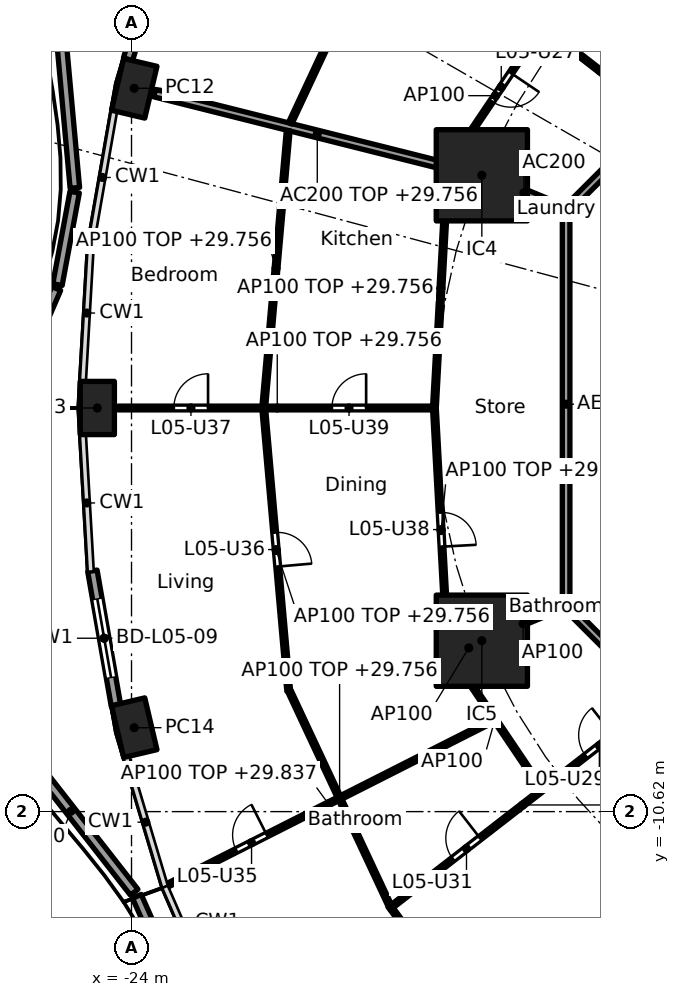
"""IFC4 building model, lengths in metres.
Left out: names, types, materials, properties, quantities, classifications, styles, units other than length and angle.
Written with IfcOpenShell. Run it as: python <this file> out.ifc"""

import sys

from ifc_helpers import new_model, si_unit, direction, frame, frame_2d, origin, origin_2d, place, context, subcontext, project, spatial, rectangle, hollow_rectangle, extrude, element, fill, save


model = new_model("IFC4")
c1 = context("Model", 3, precision=1e-05, world=origin(), true_north=direction((0.0, 1.0)))
c2 = subcontext(c1, "Body", "Model", "MODEL_VIEW")
j1 = project(units=[si_unit("LENGTHUNIT", "METRE"), si_unit("PLANEANGLEUNIT", "RADIAN")], contexts=[c1])
p1 = place(None, origin())
s1 = spatial("IfcSite", under=j1, at=p1, CompositionType="ELEMENT")
p2 = place(p1, origin())
s2 = spatial("IfcBuilding", under=s1, at=p2, CompositionType="ELEMENT")
p3 = place(p2, frame((0.0, 0.0, 27.0)))
s3 = spatial("IfcBuildingStorey", under=s2, at=p3, CompositionType="ELEMENT", Elevation=27.0)
for number, where, z_axis, x_axis in (
    (1, (-23.929, 8.412, 0.0), (0.0, 0.0, 1.0), (-0.229, -0.973, 0.0)),
    (2, (-24.9, 0.0, 0.0), (0.0, 0.0, 1.0), (0.0, -1.0, 0.0)),
    (3, (-23.929, -8.412, 0.0), (0.0, 0.0, 1.0), (0.229, -0.973, 0.0)),
):
    element("IfcColumn", number, at=place(p3, frame(where, z_axis=z_axis, x_axis=x_axis)), inside=s3, PredefinedType="COLUMN", context=c2, shape_type="SweptSolid", body=[
        extrude(hollow_rectangle(XDim=1.4, YDim=0.9, WallThickness=0.05, at=origin_2d()), origin(), (0.0, 0.0, 1.0), 3.7),
    ])
for number, where, z_axis, x_axis in (
    (4, (-14.782, 6.123, 0.0), (0.0, 0.0, 1.0), (1.0, 0.0, 0.0)),
    (5, (-14.782, -6.123, 0.0), (0.0, 0.0, 1.0), (1.0, 0.0, 0.0)),
):
    element("IfcColumn", number, at=place(p3, frame(where, z_axis=z_axis, x_axis=x_axis)), inside=s3, PredefinedType="COLUMN", context=c2, shape_type="SweptSolid", body=[
        extrude(rectangle(XDim=2.4, YDim=2.4, at=origin_2d()), origin(), (0.0, 0.0, 1.0), 3.7),
    ])
p4 = place(p3, frame((-24.092, 9.176, 0.0), z_axis=(0.0, 0.0, 1.0), x_axis=(0.285871309426, 0.958268018065, 0.0)))
e6 = element("IfcWall", 6, at=p4, inside=s3, PredefinedType="SOLIDWALL", context=c2, shape_type="SweptSolid", body=[
    extrude(rectangle(XDim=3.565, YDim=0.25, at=frame_2d((1.783, 0.0))), origin(), (0.0, 0.0, 1.0), 3.44),
])
p5 = place(p4, frame((0.733, 0.0, 0.0)))
e7 = element("IfcOpeningElement", 7, at=p5, cuts=e6, PredefinedType="OPENING", context=c2, shape_type="SweptSolid", body=[
    extrude(rectangle(XDim=2.1, YDim=2.4, at=frame_2d((1.05, 1.2))), frame((0.0, 0.135, 0.0), z_axis=(0.0, -1.0, 0.0), x_axis=(1.0, 0.0, 0.0)), (0.0, 0.0, 1.0), 0.27),
])
p6 = place(p3, frame((-24.409, -7.83, 0.0), z_axis=(0.0, 0.0, 1.0), x_axis=(-0.172217377323, 0.98505897029, 0.0)))
e8 = element("IfcWall", 8, at=p6, inside=s3, PredefinedType="SOLIDWALL", context=c2, shape_type="SweptSolid", body=[
    extrude(rectangle(XDim=3.598, YDim=0.25, at=frame_2d((1.799, 0.0))), origin(), (0.0, 0.0, 1.0), 3.44),
])
p7 = place(p6, frame((0.749, 0.0, 0.0)))
e9 = element("IfcOpeningElement", 9, at=p7, cuts=e8, PredefinedType="OPENING", context=c2, shape_type="SweptSolid", body=[
    extrude(rectangle(XDim=2.1, YDim=2.4, at=frame_2d((1.05, 1.2))), frame((0.0, 0.135, 0.0), z_axis=(0.0, -1.0, 0.0), x_axis=(1.0, 0.0, 0.0)), (0.0, 0.0, 1.0), 0.27),
])
p8 = place(p3, frame((-26.223, 13.822, 0.0), z_axis=(0.0, 0.0, 1.0), x_axis=(0.090830569169, -0.995866360364, 0.0)))
e10 = element("IfcWall", 10, at=p8, inside=s3, PredefinedType="PARAPET", context=c2, shape_type="SweptSolid", body=[
    extrude(rectangle(XDim=8.064, YDim=0.25, at=frame_2d((4.032, 0.0))), origin(), (0.0, 0.0, 1.0), 1.1),
])
p9 = place(p3, frame((-25.496, 5.679, 0.0), z_axis=(0.0, 0.0, 1.0), x_axis=(-0.182584016384, -0.983190254712, 0.0)))
e11 = element("IfcWall", 11, at=p9, inside=s3, PredefinedType="PARAPET", context=c2, shape_type="SweptSolid", body=[
    extrude(rectangle(XDim=2.474, YDim=0.25, at=frame_2d((1.237, 0.0))), origin(), (0.0, 0.0, 1.0), 1.1),
])
p10 = place(p3, frame((-25.979, 3.144, 0.0), z_axis=(0.0, 0.0, 1.0), x_axis=(-0.397314501354, -0.917682508831, 0.0)))
e12 = element("IfcWall", 12, at=p10, inside=s3, PredefinedType="PARAPET", context=c2, shape_type="SweptSolid", body=[
    extrude(rectangle(XDim=3.555, YDim=0.25, at=frame_2d((1.778, 0.0))), origin(), (0.0, 0.0, 1.0), 1.1),
])
p11 = place(p3, frame((-27.261, -8.48, 0.0), z_axis=(0.0, 0.0, 1.0), x_axis=(0.615882240598, -0.787838223061, 0.0)))
e13 = element("IfcWall", 13, at=p11, inside=s3, PredefinedType="PARAPET", context=c2, shape_type="SweptSolid", body=[
    extrude(rectangle(XDim=5.409, YDim=0.25, at=frame_2d((2.705, 0.0))), origin(), (0.0, 0.0, 1.0), 1.1),
])
p12 = place(p3, frame((-23.859, -12.849, 0.0), z_axis=(0.0, 0.0, 1.0), x_axis=(0.40486170938, -0.914377928582, 0.0)))
e14 = element("IfcWall", 14, at=p12, inside=s3, PredefinedType="PARAPET", context=c2, shape_type="SweptSolid", body=[
    extrude(rectangle(XDim=3.212, YDim=0.25, at=frame_2d((1.606, 0.0))), origin(), (0.0, 0.0, 1.0), 1.1),
])
p13 = place(p3, frame((-12.657, 5.243, 0.0), z_axis=(0.0, 0.0, 1.0), x_axis=(-0.923885664896, 0.382668627144, 0.0)))
e15 = element("IfcWall", 15, at=p13, inside=s3, PredefinedType="PARTITIONING", context=c2, shape_type="SweptSolid", body=[
    extrude(rectangle(XDim=2.2, YDim=0.2, at=frame_2d((1.1, 0.0))), origin(), (0.0, 0.0, 1.0), 3.44),
])
p14 = place(p3, frame((-14.831, 6.135, 0.0), z_axis=(0.0, 0.0, 1.0), x_axis=(-0.969884949569, 0.243563512454, 0.0)))
e16 = element("IfcWall", 16, at=p14, inside=s3, PredefinedType="PARTITIONING", context=c2, shape_type="SweptSolid", body=[
    extrude(rectangle(XDim=8.829, YDim=0.2, at=frame_2d((4.415, 0.0))), origin(), (0.0, 0.0, 1.0), 2.756),
])
p15 = place(p3, frame((-5.275, 12.494, 0.0), z_axis=(0.0, 0.0, 1.0), x_axis=(-0.707106781187, -0.707106781187, 0.0)))
e17 = element("IfcWall", 17, at=p15, inside=s3, PredefinedType="PARTITIONING", context=c2, shape_type="SweptSolid", body=[
    extrude(rectangle(XDim=10.209, YDim=0.2, at=frame_2d((5.104, 0.0))), origin(), (0.0, 0.0, 1.0), 3.44),
])
p16 = place(p3, frame((-12.565, 5.304, 0.0), z_axis=(0.0, 0.0, 1.0), x_axis=(0.0, -1.0, 0.0)))
e18 = element("IfcWall", 18, at=p16, inside=s3, PredefinedType="PARTITIONING", context=c2, shape_type="SweptSolid", body=[
    extrude(rectangle(XDim=10.409, YDim=0.2, at=frame_2d((5.205, 0.0))), origin(), (0.0, 0.0, 1.0), 3.44),
])
p17 = place(p3, frame((-12.635, -5.134, 0.0), z_axis=(0.0, 0.0, 1.0), x_axis=(0.707106781187, -0.707106781187, 0.0)))
e19 = element("IfcWall", 19, at=p17, inside=s3, PredefinedType="PARTITIONING", context=c2, shape_type="SweptSolid", body=[
    extrude(rectangle(XDim=10.609, YDim=0.2, at=frame_2d((5.305, 0.0))), origin(), (0.0, 0.0, 1.0), 3.44),
])
p18 = place(p17, frame((4.804, 0.0, 0.0)))
e20 = element("IfcOpeningElement", 20, at=p18, cuts=e19, PredefinedType="OPENING", context=c2, shape_type="SweptSolid", body=[
    extrude(rectangle(XDim=1.0, YDim=2.1, at=frame_2d((0.5, 1.05))), frame((0.0, 0.11, 0.0), z_axis=(0.0, -1.0, 0.0), x_axis=(1.0, 0.0, 0.0)), (0.0, 0.0, 1.0), 0.22),
])
p19 = place(p3, frame((-10.19, 7.719, 0.0), z_axis=(0.0, 0.0, 1.0), x_axis=(-0.790253294643, 0.612780327937, 0.0)))
e21 = element("IfcWall", 21, at=p19, inside=s3, PredefinedType="PARTITIONING", context=c2, shape_type="SweptSolid", body=[
    extrude(rectangle(XDim=3.746, YDim=0.1, at=frame_2d((1.873, 0.0))), origin(), (0.0, 0.0, 1.0), 2.687),
])
p20 = place(p3, frame((-13.218, 10.004, 0.0), z_axis=(0.0, 0.0, 1.0), x_axis=(-0.559112679527, -0.829091678641, 0.0)))
e22 = element("IfcWall", 22, at=p20, inside=s3, PredefinedType="PARTITIONING", context=c2, shape_type="SweptSolid", body=[
    extrude(rectangle(XDim=4.308, YDim=0.1, at=frame_2d((2.154, 0.0))), origin(), (0.0, 0.0, 1.0), 3.44),
])
p21 = place(p20, frame((1.433, 0.0, 0.0)))
e23 = element("IfcOpeningElement", 23, at=p21, cuts=e22, PredefinedType="OPENING", context=c2, shape_type="SweptSolid", body=[
    extrude(rectangle(XDim=0.9, YDim=2.1, at=frame_2d((0.45, 1.05))), frame((0.0, 0.06, 0.0), z_axis=(0.0, -1.0, 0.0), x_axis=(1.0, 0.0, 0.0)), (0.0, 0.0, 1.0), 0.12),
])
p22 = place(p3, frame((-17.203, 13.095, 0.0), z_axis=(0.0, 0.0, 1.0), x_axis=(-0.423926333401, -0.905696673202, 0.0)))
e24 = element("IfcWall", 24, at=p22, inside=s3, PredefinedType="PARTITIONING", context=c2, shape_type="SweptSolid", body=[
    extrude(rectangle(XDim=6.188, YDim=0.1, at=frame_2d((3.094, 0.0))), origin(), (0.0, 0.0, 1.0), 2.756),
])
p23 = place(p3, frame((-15.688, 6.249, 0.0), z_axis=(0.0, 0.0, 1.0), x_axis=(-0.054659814056, -0.998505034903, 0.0)))
e25 = element("IfcWall", 25, at=p23, inside=s3, PredefinedType="PARTITIONING", context=c2, shape_type="SweptSolid", body=[
    extrude(rectangle(XDim=6.208, YDim=0.1, at=frame_2d((3.104, 0.0))), origin(), (0.0, 0.0, 1.0), 2.756),
])
p24 = place(p3, frame((-19.877, 7.301, 0.0), z_axis=(0.0, 0.0, 1.0), x_axis=(-0.088143415068, -0.996107794558, 0.0)))
e26 = element("IfcWall", 26, at=p24, inside=s3, PredefinedType="PARTITIONING", context=c2, shape_type="SweptSolid", body=[
    extrude(rectangle(XDim=7.279, YDim=0.1, at=frame_2d((3.64, 0.0))), origin(), (0.0, 0.0, 1.0), 2.756),
])
p25 = place(p3, frame((-15.98, 0.0, 0.0), z_axis=(0.0, 0.0, 1.0), x_axis=(-1.0, 0.0, 0.0)))
e27 = element("IfcWall", 27, at=p25, inside=s3, PredefinedType="PARTITIONING", context=c2, shape_type="SweptSolid", body=[
    extrude(rectangle(XDim=8.37, YDim=0.1, at=frame_2d((4.185, 0.0))), origin(), (0.0, 0.0, 1.0), 2.756),
])
p26 = place(p25, frame((6.006, 0.0, 0.0)))
e28 = element("IfcOpeningElement", 28, at=p26, cuts=e27, PredefinedType="OPENING", context=c2, shape_type="SweptSolid", body=[
    extrude(rectangle(XDim=0.9, YDim=2.1, at=frame_2d((0.45, 1.05))), frame((0.0, 0.06, 0.0), z_axis=(0.0, -1.0, 0.0), x_axis=(1.0, 0.0, 0.0)), (0.0, 0.0, 1.0), 0.12),
])
p27 = place(p25, frame((1.846, 0.0, 0.0)))
e29 = element("IfcOpeningElement", 29, at=p27, cuts=e27, PredefinedType="OPENING", context=c2, shape_type="SweptSolid", body=[
    extrude(rectangle(XDim=0.9, YDim=2.1, at=frame_2d((0.45, 1.05))), frame((0.0, 0.06, 0.0), z_axis=(0.0, -1.0, 0.0), x_axis=(1.0, 0.0, 0.0)), (0.0, 0.0, 1.0), 0.12),
])
p28 = place(p3, frame((-16.028, -0.05, 0.0), z_axis=(0.0, 0.0, 1.0), x_axis=(0.054636410342, -0.998506315786, 0.0)))
e30 = element("IfcWall", 30, at=p28, inside=s3, PredefinedType="PARTITIONING", context=c2, shape_type="SweptSolid", body=[
    extrude(rectangle(XDim=6.359, YDim=0.1, at=frame_2d((3.179, 0.0))), origin(), (0.0, 0.0, 1.0), 2.756),
])
p29 = place(p28, frame((2.704, 0.0, 0.0)))
e31 = element("IfcOpeningElement", 31, at=p29, cuts=e30, PredefinedType="OPENING", context=c2, shape_type="SweptSolid", body=[
    extrude(rectangle(XDim=0.9, YDim=2.1, at=frame_2d((0.45, 1.05))), frame((0.0, 0.06, 0.0), z_axis=(0.0, -1.0, 0.0), x_axis=(1.0, 0.0, 0.0)), (0.0, 0.0, 1.0), 0.12),
])
p30 = place(p3, frame((-20.518, -0.05, 0.0), z_axis=(0.0, 0.0, 1.0), x_axis=(0.088138375539, -0.996108240483, 0.0)))
e32 = element("IfcWall", 32, at=p30, inside=s3, PredefinedType="PARTITIONING", context=c2, shape_type="SweptSolid", body=[
    extrude(rectangle(XDim=7.429, YDim=0.1, at=frame_2d((3.714, 0.0))), origin(), (0.0, 0.0, 1.0), 2.756),
])
p31 = place(p30, frame((3.24, 0.0, 0.0)))
e33 = element("IfcOpeningElement", 33, at=p31, cuts=e32, PredefinedType="OPENING", context=c2, shape_type="SweptSolid", body=[
    extrude(rectangle(XDim=0.9, YDim=2.1, at=frame_2d((0.45, 1.05))), frame((0.0, 0.06, 0.0), z_axis=(0.0, -1.0, 0.0), x_axis=(1.0, 0.0, 0.0)), (0.0, 0.0, 1.0), 0.12),
])
p32 = place(p3, frame((-12.657, -5.243, 0.0), z_axis=(0.0, 0.0, 1.0), x_axis=(-0.923864733477, -0.382719158442, 0.0)))
e34 = element("IfcWall", 34, at=p32, inside=s3, PredefinedType="PARTITIONING", context=c2, shape_type="SweptSolid", body=[
    extrude(rectangle(XDim=2.25, YDim=0.1, at=frame_2d((1.125, 0.0))), origin(), (0.0, 0.0, 1.0), 3.44),
])
p33 = place(p3, frame((-15.655, -6.391, 0.0), z_axis=(0.0, 0.0, 1.0), x_axis=(0.559126445155, -0.82908239538, 0.0)))
e35 = element("IfcWall", 35, at=p33, inside=s3, PredefinedType="PARTITIONING", context=c2, shape_type="SweptSolid", body=[
    extrude(rectangle(XDim=4.358, YDim=0.1, at=frame_2d((2.179, 0.0))), origin(), (0.0, 0.0, 1.0), 3.44),
])
p34 = place(p3, frame((-19.847, -7.445, 0.0), z_axis=(0.0, 0.0, 1.0), x_axis=(0.423892287987, -0.905712607942, 0.0)))
e36 = element("IfcWall", 36, at=p34, inside=s3, PredefinedType="PARTITIONING", context=c2, shape_type="SweptSolid", body=[
    extrude(rectangle(XDim=6.238, YDim=0.1, at=frame_2d((3.119, 0.0))), origin(), (0.0, 0.0, 1.0), 2.756),
])
p35 = place(p3, frame((-14.481, -8.22, 0.0), z_axis=(0.0, 0.0, 1.0), x_axis=(-0.892232077638, -0.451577146935, 0.0)))
e37 = element("IfcWall", 37, at=p35, inside=s3, PredefinedType="PARTITIONING", context=c2, shape_type="SweptSolid", body=[
    extrude(rectangle(XDim=9.723, YDim=0.1, at=frame_2d((4.862, 0.0))), origin(), (0.0, 0.0, 1.0), 2.837),
])
p36 = place(p35, frame((6.678, 0.0, 0.0)))
e38 = element("IfcOpeningElement", 38, at=p36, cuts=e37, PredefinedType="OPENING", context=c2, shape_type="SweptSolid", body=[
    extrude(rectangle(XDim=0.9, YDim=2.1, at=frame_2d((0.45, 1.05))), frame((0.0, 0.06, 0.0), z_axis=(0.0, -1.0, 0.0), x_axis=(1.0, 0.0, 0.0)), (0.0, 0.0, 1.0), 0.12),
])
p37 = place(p3, frame((-10.19, -7.719, 0.0), z_axis=(0.0, 0.0, 1.0), x_axis=(-0.790264549439, -0.612765813259, 0.0)))
e39 = element("IfcWall", 39, at=p37, inside=s3, PredefinedType="PARTITIONING", context=c2, shape_type="SweptSolid", body=[
    extrude(rectangle(XDim=8.896, YDim=0.1, at=frame_2d((4.448, 0.0))), origin(), (0.0, 0.0, 1.0), 2.687),
])
p38 = place(p37, frame((1.448, 0.0, 0.0)))
e40 = element("IfcOpeningElement", 40, at=p38, cuts=e39, PredefinedType="OPENING", context=c2, shape_type="SweptSolid", body=[
    extrude(rectangle(XDim=0.9, YDim=2.1, at=frame_2d((0.45, 1.05))), frame((0.0, 0.06, 0.0), z_axis=(0.0, -1.0, 0.0), x_axis=(1.0, 0.0, 0.0)), (0.0, 0.0, 1.0), 0.12),
])
p39 = place(p37, frame((5.871, 0.0, 0.0)))
e41 = element("IfcOpeningElement", 41, at=p39, cuts=e39, PredefinedType="OPENING", context=c2, shape_type="SweptSolid", body=[
    extrude(rectangle(XDim=0.9, YDim=2.1, at=frame_2d((0.45, 1.05))), frame((0.0, 0.06, 0.0), z_axis=(0.0, -1.0, 0.0), x_axis=(1.0, 0.0, 0.0)), (0.0, 0.0, 1.0), 0.12),
])
p40 = place(p3, frame((-17.152, -13.18, 0.0), z_axis=(0.0, 0.0, 1.0), x_axis=(0.591222750954, -0.806508312886, 0.0)))
e42 = element("IfcWall", 42, at=p40, inside=s3, PredefinedType="PARTITIONING", context=c2, shape_type="SweptSolid", body=[
    extrude(rectangle(XDim=6.31, YDim=0.1, at=frame_2d((3.155, 0.0))), origin(), (0.0, 0.0, 1.0), 2.756),
])
p41 = place(p40, frame((2.705, 0.0, 0.0)))
e43 = element("IfcOpeningElement", 43, at=p41, cuts=e42, PredefinedType="OPENING", context=c2, shape_type="SweptSolid", body=[
    extrude(rectangle(XDim=0.9, YDim=2.1, at=frame_2d((0.45, 1.05))), frame((0.0, 0.06, 0.0), z_axis=(0.0, -1.0, 0.0), x_axis=(1.0, 0.0, 0.0)), (0.0, 0.0, 1.0), 0.12),
])
p42 = place(p3, frame((-7.715, -10.193, 0.0), z_axis=(0.0, 0.0, 1.0), x_axis=(-0.573126964124, -0.819466584428, 0.0)))
e44 = element("IfcWall", 44, at=p42, inside=s3, PredefinedType="PARTITIONING", context=c2, shape_type="SweptSolid", body=[
    extrude(rectangle(XDim=15.001, YDim=0.1, at=frame_2d((7.5, 0.0))), origin(), (0.0, 0.0, 1.0), 2.687),
])
p43 = place(p42, frame((1.678, 0.0, 0.0)))
e45 = element("IfcOpeningElement", 45, at=p43, cuts=e44, PredefinedType="OPENING", context=c2, shape_type="SweptSolid", body=[
    extrude(rectangle(XDim=0.9, YDim=2.1, at=frame_2d((0.45, 1.05))), frame((0.0, 0.06, 0.0), z_axis=(0.0, -1.0, 0.0), x_axis=(1.0, 0.0, 0.0)), (0.0, 0.0, 1.0), 0.12),
])
p44 = place(p42, frame((6.631, 0.0, 0.0)))
e46 = element("IfcOpeningElement", 46, at=p44, cuts=e44, PredefinedType="OPENING", context=c2, shape_type="SweptSolid", body=[
    extrude(rectangle(XDim=0.9, YDim=2.1, at=frame_2d((0.45, 1.05))), frame((0.0, 0.06, 0.0), z_axis=(0.0, -1.0, 0.0), x_axis=(1.0, 0.0, 0.0)), (0.0, 0.0, 1.0), 0.12),
])
p45 = place(p3, frame((-15.469, -6.398, 0.0), z_axis=(0.0, 0.0, 1.0), x_axis=(0.969858002632, 0.243670791706, 0.0)))
e47 = element("IfcWall", 47, at=p45, inside=s3, PredefinedType="PARTITIONING", context=c2, shape_type="SweptSolid", body=[
    extrude(rectangle(XDim=0.708, YDim=0.1, at=frame_2d((0.354, 0.0))), origin(), (0.0, 0.0, 1.0), 3.44),
])
p46 = place(p7, origin())
e48 = element("IfcDoor", 48, at=p46, inside=s3, OperationType="SLIDING_TO_LEFT", PredefinedType="DOOR", context=c2, shape_type="SweptSolid", body=[
    extrude(rectangle(XDim=2.1, YDim=2.4, at=frame_2d((1.05, 1.2))), frame((0.0, 0.025, 0.0), z_axis=(0.0, -1.0, 0.0), x_axis=(1.0, 0.0, 0.0)), (0.0, 0.0, 1.0), 0.05),
])
fill(e9, e48)
p47 = place(p21, origin())
e49 = element("IfcDoor", 49, at=p47, inside=s3, OperationType="SINGLE_SWING_LEFT", PredefinedType="DOOR", context=c2, shape_type="SweptSolid", body=[
    extrude(rectangle(XDim=0.9, YDim=2.1, at=frame_2d((0.45, 1.05))), frame((0.0, 0.025, 0.0), z_axis=(0.0, -1.0, 0.0), x_axis=(1.0, 0.0, 0.0)), (0.0, 0.0, 1.0), 0.05),
])
fill(e23, e49)
p48 = place(p38, frame((0.9, 0.0, 0.0), x_axis=(-1.0, 0.0, 0.0)))
e50 = element("IfcDoor", 50, at=p48, inside=s3, OperationType="SINGLE_SWING_RIGHT", PredefinedType="DOOR", context=c2, shape_type="SweptSolid", body=[
    extrude(rectangle(XDim=0.9, YDim=2.1, at=frame_2d((0.45, 1.05))), frame((0.0, 0.025, 0.0), z_axis=(0.0, -1.0, 0.0), x_axis=(1.0, 0.0, 0.0)), (0.0, 0.0, 1.0), 0.05),
])
fill(e40, e50)
p49 = place(p39, frame((0.9, 0.0, 0.0), x_axis=(-1.0, 0.0, 0.0)))
e51 = element("IfcDoor", 51, at=p49, inside=s3, OperationType="SINGLE_SWING_RIGHT", PredefinedType="DOOR", context=c2, shape_type="SweptSolid", body=[
    extrude(rectangle(XDim=0.9, YDim=2.1, at=frame_2d((0.45, 1.05))), frame((0.0, 0.025, 0.0), z_axis=(0.0, -1.0, 0.0), x_axis=(1.0, 0.0, 0.0)), (0.0, 0.0, 1.0), 0.05),
])
fill(e41, e51)
p50 = place(p36, frame((0.9, 0.0, 0.0), x_axis=(-1.0, 0.0, 0.0)))
e52 = element("IfcDoor", 52, at=p50, inside=s3, OperationType="SINGLE_SWING_RIGHT", PredefinedType="DOOR", context=c2, shape_type="SweptSolid", body=[
    extrude(rectangle(XDim=0.9, YDim=2.1, at=frame_2d((0.45, 1.05))), frame((0.0, 0.025, 0.0), z_axis=(0.0, -1.0, 0.0), x_axis=(1.0, 0.0, 0.0)), (0.0, 0.0, 1.0), 0.05),
])
fill(e38, e52)
p51 = place(p31, origin())
e53 = element("IfcDoor", 53, at=p51, inside=s3, OperationType="SINGLE_SWING_RIGHT", PredefinedType="DOOR", context=c2, shape_type="SweptSolid", body=[
    extrude(rectangle(XDim=0.9, YDim=2.1, at=frame_2d((0.45, 1.05))), frame((0.0, 0.025, 0.0), z_axis=(0.0, -1.0, 0.0), x_axis=(1.0, 0.0, 0.0)), (0.0, 0.0, 1.0), 0.05),
])
fill(e33, e53)
p52 = place(p26, frame((0.9, 0.0, 0.0), x_axis=(-1.0, 0.0, 0.0)))
e54 = element("IfcDoor", 54, at=p52, inside=s3, OperationType="SINGLE_SWING_RIGHT", PredefinedType="DOOR", context=c2, shape_type="SweptSolid", body=[
    extrude(rectangle(XDim=0.9, YDim=2.1, at=frame_2d((0.45, 1.05))), frame((0.0, 0.025, 0.0), z_axis=(0.0, -1.0, 0.0), x_axis=(1.0, 0.0, 0.0)), (0.0, 0.0, 1.0), 0.05),
])
fill(e28, e54)
p53 = place(p29, origin())
e55 = element("IfcDoor", 55, at=p53, inside=s3, OperationType="SINGLE_SWING_RIGHT", PredefinedType="DOOR", context=c2, shape_type="SweptSolid", body=[
    extrude(rectangle(XDim=0.9, YDim=2.1, at=frame_2d((0.45, 1.05))), frame((0.0, 0.025, 0.0), z_axis=(0.0, -1.0, 0.0), x_axis=(1.0, 0.0, 0.0)), (0.0, 0.0, 1.0), 0.05),
])
fill(e31, e55)
p54 = place(p27, frame((0.9, 0.0, 0.0), x_axis=(-1.0, 0.0, 0.0)))
e56 = element("IfcDoor", 56, at=p54, inside=s3, OperationType="SINGLE_SWING_RIGHT", PredefinedType="DOOR", context=c2, shape_type="SweptSolid", body=[
    extrude(rectangle(XDim=0.9, YDim=2.1, at=frame_2d((0.45, 1.05))), frame((0.0, 0.025, 0.0), z_axis=(0.0, -1.0, 0.0), x_axis=(1.0, 0.0, 0.0)), (0.0, 0.0, 1.0), 0.05),
])
fill(e29, e56)
save(model, sys.argv[1])
